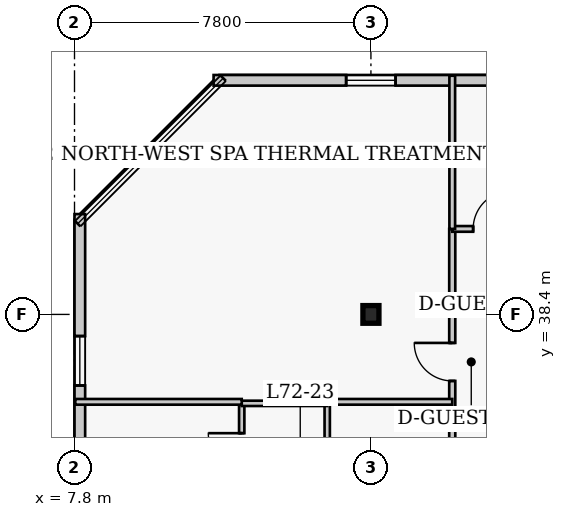
"""IFC4 building model, lengths in metres.
Left out: names, types, materials, properties, quantities, classifications, styles, units other than length and angle.
Written with IfcOpenShell. Run it as: python <this file> out.ifc"""

import sys

from ifc_helpers import new_model, si_unit, direction, frame, frame_2d, origin, origin_2d, place, context, subcontext, project, spatial, rectangle, i_section, extrude, element, fill, save


model = new_model("IFC4")
c1 = context("Model", 3, precision=1e-05, world=origin(), true_north=direction((0.0, 1.0)))
c2 = subcontext(c1, "Body", "Model", "MODEL_VIEW")
j1 = project(units=[si_unit("LENGTHUNIT", "METRE"), si_unit("PLANEANGLEUNIT", "RADIAN")], contexts=[c1])
p1 = place(None, origin())
s1 = spatial("IfcSite", under=j1, at=p1, CompositionType="ELEMENT")
p2 = place(p1, origin())
s2 = spatial("IfcBuilding", under=s1, at=p2, CompositionType="ELEMENT")
p3 = place(p2, frame((0.0, 0.0, 289.4)))
s3 = spatial("IfcBuildingStorey", under=s2, at=p3, CompositionType="ELEMENT", Elevation=289.4)
p4 = place(p3, frame((15.6, 38.4, 0.0), z_axis=(0.0, 0.0, 1.0), x_axis=(1.0, 0.0, 0.0)))
e1 = element("IfcColumn", 1, at=p4, inside=s3, PredefinedType="COLUMN", context=c2, shape_type="SweptSolid", body=[
    extrude(i_section(OverallWidth=0.422, OverallDepth=0.465, WebThickness=0.045, FlangeThickness=0.073, FilletRadius=0.017, at=origin_2d()), origin(), (0.0, 0.0, 1.0), 4.0),
])
p5 = place(p3, frame((36.29, 44.56, 0.0), z_axis=(0.0, 0.0, 1.0), x_axis=(-1.0, 0.0, 0.0)))
e2 = element("IfcWall", 2, at=p5, inside=s3, PredefinedType="SOLIDWALL", context=c2, shape_type="SweptSolid", body=[
    extrude(rectangle(XDim=24.83, YDim=0.28, at=frame_2d((12.415, 0.0))), origin(), (0.0, 0.0, 1.0), 3.76),
])
p6 = place(p5, frame((3.488, 0.0, 0.85)))
e3 = element("IfcOpeningElement", 3, at=p6, cuts=e2, PredefinedType="OPENING", context=c2, shape_type="SweptSolid", body=[
    extrude(rectangle(XDim=1.3, YDim=1.7, at=frame_2d((0.65, 0.85))), frame((0.0, 0.15, 0.0), z_axis=(0.0, -1.0, 0.0), x_axis=(1.0, 0.0, 0.0)), (0.0, 0.0, 1.0), 0.3),
])
p7 = place(p5, frame((11.765, 0.0, 0.85)))
e4 = element("IfcOpeningElement", 4, at=p7, cuts=e2, PredefinedType="OPENING", context=c2, shape_type="SweptSolid", body=[
    extrude(rectangle(XDim=1.3, YDim=1.7, at=frame_2d((0.65, 0.85))), frame((0.0, 0.15, 0.0), z_axis=(0.0, -1.0, 0.0), x_axis=(1.0, 0.0, 0.0)), (0.0, 0.0, 1.0), 0.3),
])
p8 = place(p5, frame((20.042, 0.0, 0.85)))
e5 = element("IfcOpeningElement", 5, at=p8, cuts=e2, PredefinedType="OPENING", context=c2, shape_type="SweptSolid", body=[
    extrude(rectangle(XDim=1.3, YDim=1.7, at=frame_2d((0.65, 0.85))), frame((0.0, 0.15, 0.0), z_axis=(0.0, -1.0, 0.0), x_axis=(1.0, 0.0, 0.0)), (0.0, 0.0, 1.0), 0.3),
])
p9 = place(p3, frame((7.94, 41.04, 0.0), z_axis=(0.0, 0.0, 1.0), x_axis=(0.0, -1.0, 0.0)))
e6 = element("IfcWall", 6, at=p9, inside=s3, PredefinedType="SOLIDWALL", context=c2, shape_type="SweptSolid", body=[
    extrude(rectangle(XDim=30.88, YDim=0.28, at=frame_2d((15.44, 0.0))), origin(), (0.0, 0.0, 1.0), 3.76),
])
p10 = place(p9, frame((3.21, 0.0, 0.85)))
e7 = element("IfcOpeningElement", 7, at=p10, cuts=e6, PredefinedType="OPENING", context=c2, shape_type="SweptSolid", body=[
    extrude(rectangle(XDim=1.3, YDim=1.7, at=frame_2d((0.65, 0.85))), frame((0.0, 0.15, 0.0), z_axis=(0.0, -1.0, 0.0), x_axis=(1.0, 0.0, 0.0)), (0.0, 0.0, 1.0), 0.3),
])
p11 = place(p9, frame((10.28, 0.0, 0.85)))
e8 = element("IfcOpeningElement", 8, at=p11, cuts=e6, PredefinedType="OPENING", context=c2, shape_type="SweptSolid", body=[
    extrude(rectangle(XDim=1.3, YDim=1.7, at=frame_2d((0.65, 0.85))), frame((0.0, 0.15, 0.0), z_axis=(0.0, -1.0, 0.0), x_axis=(1.0, 0.0, 0.0)), (0.0, 0.0, 1.0), 0.3),
])
p12 = place(p9, frame((18.65, 0.0, 0.85)))
e9 = element("IfcOpeningElement", 9, at=p12, cuts=e6, PredefinedType="OPENING", context=c2, shape_type="SweptSolid", body=[
    extrude(rectangle(XDim=1.3, YDim=1.7, at=frame_2d((0.65, 0.85))), frame((0.0, 0.15, 0.0), z_axis=(0.0, -1.0, 0.0), x_axis=(1.0, 0.0, 0.0)), (0.0, 0.0, 1.0), 0.3),
])
p13 = place(p9, frame((26.37, 0.0, 0.85)))
e10 = element("IfcOpeningElement", 10, at=p13, cuts=e6, PredefinedType="OPENING", context=c2, shape_type="SweptSolid", body=[
    extrude(rectangle(XDim=1.3, YDim=1.7, at=frame_2d((0.65, 0.85))), frame((0.0, 0.15, 0.0), z_axis=(0.0, -1.0, 0.0), x_axis=(1.0, 0.0, 0.0)), (0.0, 0.0, 1.0), 0.3),
])
p14 = place(p3, frame((17.74, 8.55, 0.0), z_axis=(0.0, 0.0, 1.0), x_axis=(0.0, 1.0, 0.0)))
e11 = element("IfcWall", 11, at=p14, inside=s3, PredefinedType="PARTITIONING", context=c2, shape_type="SweptSolid", body=[
    extrude(rectangle(XDim=32.1, YDim=0.16, at=frame_2d((16.05, 0.0))), origin(), (0.0, 0.0, 1.0), 3.76),
])
p15 = place(p14, frame((5.25, 0.0, 0.0)))
e12 = element("IfcOpeningElement", 12, at=p15, cuts=e11, PredefinedType="OPENING", context=c2, shape_type="SweptSolid", body=[
    extrude(rectangle(XDim=0.95, YDim=2.1, at=frame_2d((0.475, 1.05))), frame((0.0, 0.09, 0.0), z_axis=(0.0, -1.0, 0.0), x_axis=(1.0, 0.0, 0.0)), (0.0, 0.0, 1.0), 0.18),
])
p16 = place(p14, frame((15.375, 0.0, 0.0)))
e13 = element("IfcOpeningElement", 13, at=p16, cuts=e11, PredefinedType="OPENING", context=c2, shape_type="SweptSolid", body=[
    extrude(rectangle(XDim=0.95, YDim=2.1, at=frame_2d((0.475, 1.05))), frame((0.0, 0.09, 0.0), z_axis=(0.0, -1.0, 0.0), x_axis=(1.0, 0.0, 0.0)), (0.0, 0.0, 1.0), 0.18),
])
p17 = place(p14, frame((23.425, 0.0, 0.0)))
e14 = element("IfcOpeningElement", 14, at=p17, cuts=e11, PredefinedType="OPENING", context=c2, shape_type="SweptSolid", body=[
    extrude(rectangle(XDim=0.95, YDim=2.1, at=frame_2d((0.475, 1.05))), frame((0.0, 0.09, 0.0), z_axis=(0.0, -1.0, 0.0), x_axis=(1.0, 0.0, 0.0)), (0.0, 0.0, 1.0), 0.18),
])
p18 = place(p14, frame((28.1, 0.0, 0.0)))
e15 = element("IfcOpeningElement", 15, at=p18, cuts=e11, PredefinedType="OPENING", context=c2, shape_type="SweptSolid", body=[
    extrude(rectangle(XDim=1.0, YDim=2.15, at=frame_2d((0.5, 1.075))), frame((0.0, 0.09, 0.0), z_axis=(0.0, -1.0, 0.0), x_axis=(1.0, 0.0, 0.0)), (0.0, 0.0, 1.0), 0.18),
])
p19 = place(p3, frame((17.74, 40.65, 0.0), z_axis=(0.0, 0.0, 1.0), x_axis=(1.0, 0.0, 0.0)))
e16 = element("IfcWall", 16, at=p19, inside=s3, PredefinedType="PARTITIONING", context=c2, shape_type="SweptSolid", body=[
    extrude(rectangle(XDim=4.36, YDim=0.15, at=frame_2d((2.18, 0.0))), origin(), (0.0, 0.0, 1.0), 3.76),
])
p20 = place(p19, frame((0.55, 0.0, 0.0)))
e17 = element("IfcOpeningElement", 17, at=p20, cuts=e16, PredefinedType="OPENING", context=c2, shape_type="SweptSolid", body=[
    extrude(rectangle(XDim=1.0, YDim=2.15, at=frame_2d((0.5, 1.075))), frame((0.0, 0.085, 0.0), z_axis=(0.0, -1.0, 0.0), x_axis=(1.0, 0.0, 0.0)), (0.0, 0.0, 1.0), 0.17),
])
p21 = place(p3, frame((17.74, 40.65, 0.0), z_axis=(0.0, 0.0, 1.0), x_axis=(0.0, 1.0, 0.0)))
e18 = element("IfcWall", 18, at=p21, inside=s3, PredefinedType="PARTITIONING", context=c2, shape_type="SweptSolid", body=[
    extrude(rectangle(XDim=4.03, YDim=0.15, at=frame_2d((2.015, 0.0))), origin(), (0.0, 0.0, 1.0), 3.76),
])
p22 = place(p3, frame((12.2, 33.61, 0.0), z_axis=(0.0, 0.0, 1.0), x_axis=(0.0, 1.0, 0.0)))
e19 = element("IfcWall", 19, at=p22, inside=s3, PredefinedType="PLUMBINGWALL", context=c2, shape_type="SweptSolid", body=[
    extrude(rectangle(XDim=2.45, YDim=0.14, at=frame_2d((1.225, 0.0))), origin(), (0.0, 0.0, 1.0), 3.76),
])
p23 = place(p22, frame((0.785, 0.0, 0.0)))
e20 = element("IfcOpeningElement", 20, at=p23, cuts=e19, PredefinedType="OPENING", context=c2, shape_type="SweptSolid", body=[
    extrude(rectangle(XDim=0.88, YDim=2.05, at=frame_2d((0.44, 1.025))), frame((0.0, 0.08, 0.0), z_axis=(0.0, -1.0, 0.0), x_axis=(1.0, 0.0, 0.0)), (0.0, 0.0, 1.0), 0.16),
])
p24 = place(p3, frame((14.45, 33.61, 0.0), z_axis=(0.0, 0.0, 1.0), x_axis=(0.0, 1.0, 0.0)))
e21 = element("IfcWall", 21, at=p24, inside=s3, PredefinedType="PLUMBINGWALL", context=c2, shape_type="SweptSolid", body=[
    extrude(rectangle(XDim=2.45, YDim=0.14, at=frame_2d((1.225, 0.0))), origin(), (0.0, 0.0, 1.0), 3.76),
])
p25 = place(p3, frame((12.2, 36.06, 0.0), z_axis=(0.0, 0.0, 1.0), x_axis=(1.0, 0.0, 0.0)))
e22 = element("IfcWall", 22, at=p25, inside=s3, PredefinedType="PLUMBINGWALL", context=c2, shape_type="SweptSolid", body=[
    extrude(rectangle(XDim=2.25, YDim=0.14, at=frame_2d((1.125, 0.0))), origin(), (0.0, 0.0, 1.0), 3.76),
])
p26 = place(p3, frame((7.82, 36.1, 0.0), z_axis=(0.0, 0.0, 1.0), x_axis=(1.0, 0.0, 0.0)))
e23 = element("IfcWall", 23, at=p26, inside=s3, PredefinedType="PARTITIONING", context=c2, shape_type="SweptSolid", body=[
    extrude(rectangle(XDim=4.38, YDim=0.15, at=frame_2d((2.19, 0.0))), origin(), (0.0, 0.0, 1.0), 3.76),
])
p27 = place(p3, frame((14.45, 36.1, 0.0), z_axis=(0.0, 0.0, 1.0), x_axis=(1.0, 0.0, 0.0)))
e24 = element("IfcWall", 24, at=p27, inside=s3, PredefinedType="PARTITIONING", context=c2, shape_type="SweptSolid", body=[
    extrude(rectangle(XDim=3.29, YDim=0.15, at=frame_2d((1.645, 0.0))), origin(), (0.0, 0.0, 1.0), 3.76),
])
p28 = place(p8, origin())
e25 = element("IfcWindow", 25, at=p28, inside=s3, PartitioningType="SINGLE_PANEL", PredefinedType="WINDOW", context=c2, shape_type="SweptSolid", body=[
    extrude(rectangle(XDim=1.3, YDim=1.7, at=frame_2d((0.65, 0.85))), frame((0.0, 0.03, 0.0), z_axis=(0.0, -1.0, 0.0), x_axis=(1.0, 0.0, 0.0)), (0.0, 0.0, 1.0), 0.06),
])
fill(e5, e25)
p29 = place(p10, origin())
e26 = element("IfcWindow", 26, at=p29, inside=s3, PartitioningType="SINGLE_PANEL", PredefinedType="WINDOW", context=c2, shape_type="SweptSolid", body=[
    extrude(rectangle(XDim=1.3, YDim=1.7, at=frame_2d((0.65, 0.85))), frame((0.0, 0.03, 0.0), z_axis=(0.0, -1.0, 0.0), x_axis=(1.0, 0.0, 0.0)), (0.0, 0.0, 1.0), 0.06),
])
fill(e7, e26)
p30 = place(p20, origin())
e27 = element("IfcDoor", 27, at=p30, inside=s3, OperationType="SINGLE_SWING_RIGHT", PredefinedType="DOOR", context=c2, shape_type="SweptSolid", body=[
    extrude(rectangle(XDim=1.0, YDim=2.15, at=frame_2d((0.5, 1.075))), frame((0.0, 0.025, 0.0), z_axis=(0.0, -1.0, 0.0), x_axis=(1.0, 0.0, 0.0)), (0.0, 0.0, 1.0), 0.05),
])
fill(e17, e27)
p31 = place(p23, origin())
e28 = element("IfcDoor", 28, at=p31, inside=s3, OperationType="SINGLE_SWING_RIGHT", PredefinedType="DOOR", context=c2, shape_type="SweptSolid", body=[
    extrude(rectangle(XDim=0.88, YDim=2.05, at=frame_2d((0.44, 1.025))), frame((0.0, 0.025, 0.0), z_axis=(0.0, -1.0, 0.0), x_axis=(1.0, 0.0, 0.0)), (0.0, 0.0, 1.0), 0.05),
])
fill(e20, e28)
p32 = place(p18, origin())
e29 = element("IfcDoor", 29, at=p32, inside=s3, OperationType="SINGLE_SWING_RIGHT", PredefinedType="DOOR", context=c2, shape_type="SweptSolid", body=[
    extrude(rectangle(XDim=1.0, YDim=2.15, at=frame_2d((0.5, 1.075))), frame((0.0, 0.025, 0.0), z_axis=(0.0, -1.0, 0.0), x_axis=(1.0, 0.0, 0.0)), (0.0, 0.0, 1.0), 0.05),
])
fill(e15, e29)
save(model, sys.argv[1])
